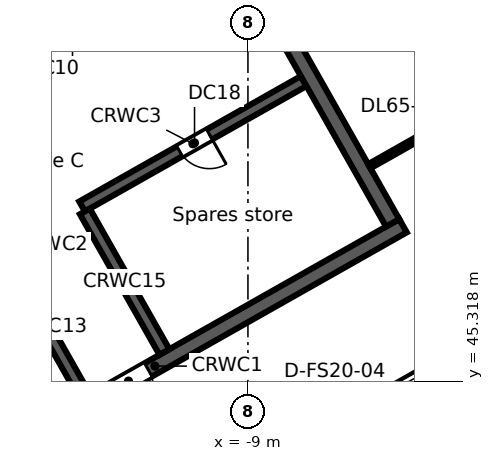
"""IFC4 building model, lengths in metres.
Left out: names, types, materials, properties, quantities, classifications, styles, units other than length and angle.
Written with IfcOpenShell. Run it as: python <this file> out.ifc"""

import sys

from ifc_helpers import new_model, si_unit, direction, frame, frame_2d, origin, place, context, subcontext, project, spatial, rectangle, extrude, element, fill, save


model = new_model("IFC4")
c1 = context("Model", 3, precision=1e-05, world=origin(), true_north=direction((0.0, 1.0)))
c2 = subcontext(c1, "Body", "Model", "MODEL_VIEW")
j1 = project(units=[si_unit("LENGTHUNIT", "METRE"), si_unit("PLANEANGLEUNIT", "RADIAN")], contexts=[c1])
p1 = place(None, origin())
s1 = spatial("IfcSite", under=j1, at=p1, CompositionType="ELEMENT")
p2 = place(p1, origin())
s2 = spatial("IfcBuilding", under=s1, at=p2, CompositionType="ELEMENT")
p3 = place(p2, frame((0.0, 0.0, 300.7)))
s3 = spatial("IfcBuildingStorey", under=s2, at=p3, CompositionType="ELEMENT", Elevation=300.7)
p4 = place(p3, frame((-58.732, 38.771, 0.0), z_axis=(0.0, 0.0, 1.0), x_axis=(0.870355615581, 0.492423702137, 0.0)))
e1 = element("IfcWall", 1, at=p4, inside=s3, PredefinedType="STANDARD", context=c2, shape_type="SweptSolid", body=[
    extrude(rectangle(XDim=64.052, YDim=0.25, at=frame_2d((32.026, 0.0))), origin(), (0.0, 0.0, 1.0), 3.52),
])
p5 = place(p4, frame((61.259, 0.0, 0.8)))
e2 = element("IfcOpeningElement", 2, at=p5, cuts=e1, PredefinedType="OPENING", context=c2, shape_type="SweptSolid", body=[
    extrude(rectangle(XDim=2.4, YDim=2.2, at=frame_2d((1.2, 1.1))), frame((0.0, 0.135, 0.0), z_axis=(0.0, -1.0, 0.0), x_axis=(1.0, 0.0, 0.0)), (0.0, 0.0, 1.0), 0.27),
])
p6 = place(p4, frame((58.216, 0.0, 0.8)))
e3 = element("IfcOpeningElement", 3, at=p6, cuts=e1, PredefinedType="OPENING", context=c2, shape_type="SweptSolid", body=[
    extrude(rectangle(XDim=2.4, YDim=2.2, at=frame_2d((1.2, 1.1))), frame((0.0, 0.135, 0.0), z_axis=(0.0, -1.0, 0.0), x_axis=(1.0, 0.0, 0.0)), (0.0, 0.0, 1.0), 0.27),
])
p7 = place(p4, frame((55.173, 0.0, 0.8)))
e4 = element("IfcOpeningElement", 4, at=p7, cuts=e1, PredefinedType="OPENING", context=c2, shape_type="SweptSolid", body=[
    extrude(rectangle(XDim=2.4, YDim=2.2, at=frame_2d((1.2, 1.1))), frame((0.0, 0.135, 0.0), z_axis=(0.0, -1.0, 0.0), x_axis=(1.0, 0.0, 0.0)), (0.0, 0.0, 1.0), 0.27),
])
p8 = place(p4, frame((52.129, 0.0, 0.8)))
e5 = element("IfcOpeningElement", 5, at=p8, cuts=e1, PredefinedType="OPENING", context=c2, shape_type="SweptSolid", body=[
    extrude(rectangle(XDim=2.4, YDim=2.2, at=frame_2d((1.2, 1.1))), frame((0.0, 0.135, 0.0), z_axis=(0.0, -1.0, 0.0), x_axis=(1.0, 0.0, 0.0)), (0.0, 0.0, 1.0), 0.27),
])
p9 = place(p4, frame((49.086, 0.0, 0.8)))
e6 = element("IfcOpeningElement", 6, at=p9, cuts=e1, PredefinedType="OPENING", context=c2, shape_type="SweptSolid", body=[
    extrude(rectangle(XDim=2.4, YDim=2.2, at=frame_2d((1.2, 1.1))), frame((0.0, 0.135, 0.0), z_axis=(0.0, -1.0, 0.0), x_axis=(1.0, 0.0, 0.0)), (0.0, 0.0, 1.0), 0.27),
])
p10 = place(p4, frame((46.043, 0.0, 0.8)))
e7 = element("IfcOpeningElement", 7, at=p10, cuts=e1, PredefinedType="OPENING", context=c2, shape_type="SweptSolid", body=[
    extrude(rectangle(XDim=2.4, YDim=2.2, at=frame_2d((1.2, 1.1))), frame((0.0, 0.135, 0.0), z_axis=(0.0, -1.0, 0.0), x_axis=(1.0, 0.0, 0.0)), (0.0, 0.0, 1.0), 0.27),
])
p11 = place(p4, frame((43.0, 0.0, 0.8)))
e8 = element("IfcOpeningElement", 8, at=p11, cuts=e1, PredefinedType="OPENING", context=c2, shape_type="SweptSolid", body=[
    extrude(rectangle(XDim=2.4, YDim=2.2, at=frame_2d((1.2, 1.1))), frame((0.0, 0.135, 0.0), z_axis=(0.0, -1.0, 0.0), x_axis=(1.0, 0.0, 0.0)), (0.0, 0.0, 1.0), 0.27),
])
p12 = place(p4, frame((39.956, 0.0, 0.8)))
e9 = element("IfcOpeningElement", 9, at=p12, cuts=e1, PredefinedType="OPENING", context=c2, shape_type="SweptSolid", body=[
    extrude(rectangle(XDim=2.4, YDim=2.2, at=frame_2d((1.2, 1.1))), frame((0.0, 0.135, 0.0), z_axis=(0.0, -1.0, 0.0), x_axis=(1.0, 0.0, 0.0)), (0.0, 0.0, 1.0), 0.27),
])
p13 = place(p4, frame((36.913, 0.0, 0.8)))
e10 = element("IfcOpeningElement", 10, at=p13, cuts=e1, PredefinedType="OPENING", context=c2, shape_type="SweptSolid", body=[
    extrude(rectangle(XDim=2.4, YDim=2.2, at=frame_2d((1.2, 1.1))), frame((0.0, 0.135, 0.0), z_axis=(0.0, -1.0, 0.0), x_axis=(1.0, 0.0, 0.0)), (0.0, 0.0, 1.0), 0.27),
])
p14 = place(p4, frame((33.87, 0.0, 0.8)))
e11 = element("IfcOpeningElement", 11, at=p14, cuts=e1, PredefinedType="OPENING", context=c2, shape_type="SweptSolid", body=[
    extrude(rectangle(XDim=2.4, YDim=2.2, at=frame_2d((1.2, 1.1))), frame((0.0, 0.135, 0.0), z_axis=(0.0, -1.0, 0.0), x_axis=(1.0, 0.0, 0.0)), (0.0, 0.0, 1.0), 0.27),
])
p15 = place(p4, frame((30.826, 0.0, 0.8)))
e12 = element("IfcOpeningElement", 12, at=p15, cuts=e1, PredefinedType="OPENING", context=c2, shape_type="SweptSolid", body=[
    extrude(rectangle(XDim=2.4, YDim=2.2, at=frame_2d((1.2, 1.1))), frame((0.0, 0.135, 0.0), z_axis=(0.0, -1.0, 0.0), x_axis=(1.0, 0.0, 0.0)), (0.0, 0.0, 1.0), 0.27),
])
p16 = place(p4, frame((27.783, 0.0, 0.8)))
e13 = element("IfcOpeningElement", 13, at=p16, cuts=e1, PredefinedType="OPENING", context=c2, shape_type="SweptSolid", body=[
    extrude(rectangle(XDim=2.4, YDim=2.2, at=frame_2d((1.2, 1.1))), frame((0.0, 0.135, 0.0), z_axis=(0.0, -1.0, 0.0), x_axis=(1.0, 0.0, 0.0)), (0.0, 0.0, 1.0), 0.27),
])
p17 = place(p4, frame((24.74, 0.0, 0.8)))
e14 = element("IfcOpeningElement", 14, at=p17, cuts=e1, PredefinedType="OPENING", context=c2, shape_type="SweptSolid", body=[
    extrude(rectangle(XDim=2.4, YDim=2.2, at=frame_2d((1.2, 1.1))), frame((0.0, 0.135, 0.0), z_axis=(0.0, -1.0, 0.0), x_axis=(1.0, 0.0, 0.0)), (0.0, 0.0, 1.0), 0.27),
])
p18 = place(p4, frame((21.696, 0.0, 0.8)))
e15 = element("IfcOpeningElement", 15, at=p18, cuts=e1, PredefinedType="OPENING", context=c2, shape_type="SweptSolid", body=[
    extrude(rectangle(XDim=2.4, YDim=2.2, at=frame_2d((1.2, 1.1))), frame((0.0, 0.135, 0.0), z_axis=(0.0, -1.0, 0.0), x_axis=(1.0, 0.0, 0.0)), (0.0, 0.0, 1.0), 0.27),
])
p19 = place(p4, frame((18.653, 0.0, 0.8)))
e16 = element("IfcOpeningElement", 16, at=p19, cuts=e1, PredefinedType="OPENING", context=c2, shape_type="SweptSolid", body=[
    extrude(rectangle(XDim=2.4, YDim=2.2, at=frame_2d((1.2, 1.1))), frame((0.0, 0.135, 0.0), z_axis=(0.0, -1.0, 0.0), x_axis=(1.0, 0.0, 0.0)), (0.0, 0.0, 1.0), 0.27),
])
p20 = place(p4, frame((15.61, 0.0, 0.8)))
e17 = element("IfcOpeningElement", 17, at=p20, cuts=e1, PredefinedType="OPENING", context=c2, shape_type="SweptSolid", body=[
    extrude(rectangle(XDim=2.4, YDim=2.2, at=frame_2d((1.2, 1.1))), frame((0.0, 0.135, 0.0), z_axis=(0.0, -1.0, 0.0), x_axis=(1.0, 0.0, 0.0)), (0.0, 0.0, 1.0), 0.27),
])
p21 = place(p4, frame((12.567, 0.0, 0.8)))
e18 = element("IfcOpeningElement", 18, at=p21, cuts=e1, PredefinedType="OPENING", context=c2, shape_type="SweptSolid", body=[
    extrude(rectangle(XDim=2.4, YDim=2.2, at=frame_2d((1.2, 1.1))), frame((0.0, 0.135, 0.0), z_axis=(0.0, -1.0, 0.0), x_axis=(1.0, 0.0, 0.0)), (0.0, 0.0, 1.0), 0.27),
])
p22 = place(p4, frame((9.523, 0.0, 0.8)))
e19 = element("IfcOpeningElement", 19, at=p22, cuts=e1, PredefinedType="OPENING", context=c2, shape_type="SweptSolid", body=[
    extrude(rectangle(XDim=2.4, YDim=2.2, at=frame_2d((1.2, 1.1))), frame((0.0, 0.135, 0.0), z_axis=(0.0, -1.0, 0.0), x_axis=(1.0, 0.0, 0.0)), (0.0, 0.0, 1.0), 0.27),
])
p23 = place(p4, frame((6.48, 0.0, 0.8)))
e20 = element("IfcOpeningElement", 20, at=p23, cuts=e1, PredefinedType="OPENING", context=c2, shape_type="SweptSolid", body=[
    extrude(rectangle(XDim=2.4, YDim=2.2, at=frame_2d((1.2, 1.1))), frame((0.0, 0.135, 0.0), z_axis=(0.0, -1.0, 0.0), x_axis=(1.0, 0.0, 0.0)), (0.0, 0.0, 1.0), 0.27),
])
p24 = place(p4, frame((3.437, 0.0, 0.8)))
e21 = element("IfcOpeningElement", 21, at=p24, cuts=e1, PredefinedType="OPENING", context=c2, shape_type="SweptSolid", body=[
    extrude(rectangle(XDim=2.4, YDim=2.2, at=frame_2d((1.2, 1.1))), frame((0.0, 0.135, 0.0), z_axis=(0.0, -1.0, 0.0), x_axis=(1.0, 0.0, 0.0)), (0.0, 0.0, 1.0), 0.27),
])
p25 = place(p4, frame((0.393, 0.0, 0.8)))
e22 = element("IfcOpeningElement", 22, at=p25, cuts=e1, PredefinedType="OPENING", context=c2, shape_type="SweptSolid", body=[
    extrude(rectangle(XDim=2.4, YDim=2.2, at=frame_2d((1.2, 1.1))), frame((0.0, 0.135, 0.0), z_axis=(0.0, -1.0, 0.0), x_axis=(1.0, 0.0, 0.0)), (0.0, 0.0, 1.0), 0.27),
])
p26 = place(p3, frame((-3.017, 46.293, 0.0), z_axis=(0.0, 0.0, 1.0), x_axis=(-0.870355474887, -0.492423950812, 0.0)))
e23 = element("IfcWall", 23, at=p26, inside=s3, PredefinedType="STANDARD", context=c2, shape_type="SweptSolid", body=[
    extrude(rectangle(XDim=40.34, YDim=0.25, at=frame_2d((20.17, 0.0))), origin(), (0.0, 0.0, 1.0), 3.52),
])
p27 = place(p26, frame((37.428, 0.0, 0.8)))
e24 = element("IfcOpeningElement", 24, at=p27, cuts=e23, PredefinedType="OPENING", context=c2, shape_type="SweptSolid", body=[
    extrude(rectangle(XDim=2.4, YDim=2.2, at=frame_2d((1.2, 1.1))), frame((0.0, 0.135, 0.0), z_axis=(0.0, -1.0, 0.0), x_axis=(1.0, 0.0, 0.0)), (0.0, 0.0, 1.0), 0.27),
])
p28 = place(p26, frame((34.372, 0.0, 0.0)))
e25 = element("IfcOpeningElement", 25, at=p28, cuts=e23, PredefinedType="OPENING", context=c2, shape_type="SweptSolid", body=[
    extrude(rectangle(XDim=1.8, YDim=2.4, at=frame_2d((0.9, 1.2))), frame((0.0, 0.135, 0.0), z_axis=(0.0, -1.0, 0.0), x_axis=(1.0, 0.0, 0.0)), (0.0, 0.0, 1.0), 0.27),
])
p29 = place(p26, frame((30.716, 0.0, 0.8)))
e26 = element("IfcOpeningElement", 26, at=p29, cuts=e23, PredefinedType="OPENING", context=c2, shape_type="SweptSolid", body=[
    extrude(rectangle(XDim=2.4, YDim=2.2, at=frame_2d((1.2, 1.1))), frame((0.0, 0.135, 0.0), z_axis=(0.0, -1.0, 0.0), x_axis=(1.0, 0.0, 0.0)), (0.0, 0.0, 1.0), 0.27),
])
p30 = place(p26, frame((27.36, 0.0, 0.8)))
e27 = element("IfcOpeningElement", 27, at=p30, cuts=e23, PredefinedType="OPENING", context=c2, shape_type="SweptSolid", body=[
    extrude(rectangle(XDim=2.4, YDim=2.2, at=frame_2d((1.2, 1.1))), frame((0.0, 0.135, 0.0), z_axis=(0.0, -1.0, 0.0), x_axis=(1.0, 0.0, 0.0)), (0.0, 0.0, 1.0), 0.27),
])
p31 = place(p26, frame((24.304, 0.0, 0.0)))
e28 = element("IfcOpeningElement", 28, at=p31, cuts=e23, PredefinedType="OPENING", context=c2, shape_type="SweptSolid", body=[
    extrude(rectangle(XDim=1.8, YDim=2.4, at=frame_2d((0.9, 1.2))), frame((0.0, 0.135, 0.0), z_axis=(0.0, -1.0, 0.0), x_axis=(1.0, 0.0, 0.0)), (0.0, 0.0, 1.0), 0.27),
])
p32 = place(p26, frame((20.648, 0.0, 0.8)))
e29 = element("IfcOpeningElement", 29, at=p32, cuts=e23, PredefinedType="OPENING", context=c2, shape_type="SweptSolid", body=[
    extrude(rectangle(XDim=2.4, YDim=2.2, at=frame_2d((1.2, 1.1))), frame((0.0, 0.135, 0.0), z_axis=(0.0, -1.0, 0.0), x_axis=(1.0, 0.0, 0.0)), (0.0, 0.0, 1.0), 0.27),
])
p33 = place(p26, frame((17.292, 0.0, 0.8)))
e30 = element("IfcOpeningElement", 30, at=p33, cuts=e23, PredefinedType="OPENING", context=c2, shape_type="SweptSolid", body=[
    extrude(rectangle(XDim=2.4, YDim=2.2, at=frame_2d((1.2, 1.1))), frame((0.0, 0.135, 0.0), z_axis=(0.0, -1.0, 0.0), x_axis=(1.0, 0.0, 0.0)), (0.0, 0.0, 1.0), 0.27),
])
p34 = place(p26, frame((14.236, 0.0, 0.0)))
e31 = element("IfcOpeningElement", 31, at=p34, cuts=e23, PredefinedType="OPENING", context=c2, shape_type="SweptSolid", body=[
    extrude(rectangle(XDim=1.8, YDim=2.4, at=frame_2d((0.9, 1.2))), frame((0.0, 0.135, 0.0), z_axis=(0.0, -1.0, 0.0), x_axis=(1.0, 0.0, 0.0)), (0.0, 0.0, 1.0), 0.27),
])
p35 = place(p26, frame((10.58, 0.0, 0.8)))
e32 = element("IfcOpeningElement", 32, at=p35, cuts=e23, PredefinedType="OPENING", context=c2, shape_type="SweptSolid", body=[
    extrude(rectangle(XDim=2.4, YDim=2.2, at=frame_2d((1.2, 1.1))), frame((0.0, 0.135, 0.0), z_axis=(0.0, -1.0, 0.0), x_axis=(1.0, 0.0, 0.0)), (0.0, 0.0, 1.0), 0.27),
])
p36 = place(p26, frame((7.224, 0.0, 0.8)))
e33 = element("IfcOpeningElement", 33, at=p36, cuts=e23, PredefinedType="OPENING", context=c2, shape_type="SweptSolid", body=[
    extrude(rectangle(XDim=2.4, YDim=2.2, at=frame_2d((1.2, 1.1))), frame((0.0, 0.135, 0.0), z_axis=(0.0, -1.0, 0.0), x_axis=(1.0, 0.0, 0.0)), (0.0, 0.0, 1.0), 0.27),
])
p37 = place(p26, frame((4.168, 0.0, 0.0)))
e34 = element("IfcOpeningElement", 34, at=p37, cuts=e23, PredefinedType="OPENING", context=c2, shape_type="SweptSolid", body=[
    extrude(rectangle(XDim=1.8, YDim=2.4, at=frame_2d((0.9, 1.2))), frame((0.0, 0.135, 0.0), z_axis=(0.0, -1.0, 0.0), x_axis=(1.0, 0.0, 0.0)), (0.0, 0.0, 1.0), 0.27),
])
p38 = place(p26, frame((0.512, 0.0, 0.8)))
e35 = element("IfcOpeningElement", 35, at=p38, cuts=e23, PredefinedType="OPENING", context=c2, shape_type="SweptSolid", body=[
    extrude(rectangle(XDim=2.4, YDim=2.2, at=frame_2d((1.2, 1.1))), frame((0.0, 0.135, 0.0), z_axis=(0.0, -1.0, 0.0), x_axis=(1.0, 0.0, 0.0)), (0.0, 0.0, 1.0), 0.27),
])
p39 = place(p3, frame((-17.975, 42.017, 0.0), z_axis=(0.0, 0.0, 1.0), x_axis=(0.87034965173, 0.492434243055, 0.0)))
e36 = element("IfcWall", 36, at=p39, inside=s3, PredefinedType="SOLIDWALL", context=c2, shape_type="SweptSolid", body=[
    extrude(rectangle(XDim=15.0, YDim=0.4, at=frame_2d((7.5, 0.0))), origin(), (0.0, 0.0, 1.0), 3.52),
])
p40 = place(p39, frame((6.1, 0.0, 0.0)))
e37 = element("IfcOpeningElement", 37, at=p40, cuts=e36, PredefinedType="OPENING", context=c2, shape_type="SweptSolid", body=[
    extrude(rectangle(XDim=1.2, YDim=2.1, at=frame_2d((0.6, 1.05))), frame((0.0, 0.21, 0.0), z_axis=(0.0, -1.0, 0.0), x_axis=(1.0, 0.0, 0.0)), (0.0, 0.0, 1.0), 0.42),
])
p41 = place(p3, frame((-13.365, 49.911, 0.0), z_axis=(0.0, 0.0, 1.0), x_axis=(0.870347618718, 0.492437836272, 0.0)))
e38 = element("IfcWall", 38, at=p41, inside=s3, PredefinedType="SOLIDWALL", context=c2, shape_type="SweptSolid", body=[
    extrude(rectangle(XDim=6.7, YDim=0.3, at=frame_2d((3.35, 0.0))), origin(), (0.0, 0.0, 1.0), 3.52),
])
p42 = place(p41, frame((2.95, 0.0, 0.0)))
e39 = element("IfcOpeningElement", 39, at=p42, cuts=e38, PredefinedType="OPENING", context=c2, shape_type="SweptSolid", body=[
    extrude(rectangle(XDim=0.9, YDim=2.1, at=frame_2d((0.45, 1.05))), frame((0.0, 0.16, 0.0), z_axis=(0.0, -1.0, 0.0), x_axis=(1.0, 0.0, 0.0)), (0.0, 0.0, 1.0), 0.32),
])
p43 = place(p3, frame((-15.618, 53.691, 0.0), z_axis=(0.0, 0.0, 1.0), x_axis=(0.870362830851, 0.492410948978, 0.0)))
e40 = element("IfcWall", 40, at=p43, inside=s3, PredefinedType="SOLIDWALL", context=c2, shape_type="SweptSolid", body=[
    extrude(rectangle(XDim=6.8, YDim=0.3, at=frame_2d((3.4, 0.0))), origin(), (0.0, 0.0, 1.0), 3.52),
])
p44 = place(p43, frame((1.85, 0.0, 0.0)))
e41 = element("IfcOpeningElement", 41, at=p44, cuts=e40, PredefinedType="OPENING", context=c2, shape_type="SweptSolid", body=[
    extrude(rectangle(XDim=0.9, YDim=2.1, at=frame_2d((0.45, 1.05))), frame((0.0, 0.16, 0.0), z_axis=(0.0, -1.0, 0.0), x_axis=(1.0, 0.0, 0.0)), (0.0, 0.0, 1.0), 0.32),
])
p45 = place(p43, frame((5.3, 0.0, 0.0)))
e42 = element("IfcOpeningElement", 42, at=p45, cuts=e40, PredefinedType="OPENING", context=c2, shape_type="SweptSolid", body=[
    extrude(rectangle(XDim=0.9, YDim=2.1, at=frame_2d((0.45, 1.05))), frame((0.0, 0.16, 0.0), z_axis=(0.0, -1.0, 0.0), x_axis=(1.0, 0.0, 0.0)), (0.0, 0.0, 1.0), 0.32),
])
p46 = place(p3, frame((-24.672, 53.854, 0.0), z_axis=(0.0, 0.0, 1.0), x_axis=(0.870353598469, 0.492427267353, 0.0)))
e43 = element("IfcWall", 43, at=p46, inside=s3, PredefinedType="SOLIDWALL", context=c2, shape_type="SweptSolid", body=[
    extrude(rectangle(XDim=15.0, YDim=0.4, at=frame_2d((7.5, 0.0))), origin(), (0.0, 0.0, 1.0), 3.52),
])
p47 = place(p3, frame((-15.379, 48.599, 0.0), z_axis=(0.0, 0.0, 1.0), x_axis=(0.492422543467, -0.870356271124, 0.0)))
e44 = element("IfcWall", 44, at=p47, inside=s3, PredefinedType="SOLIDWALL", context=c2, shape_type="SweptSolid", body=[
    extrude(rectangle(XDim=4.25, YDim=0.3, at=frame_2d((2.125, 0.0))), origin(), (0.0, 0.0, 1.0), 3.52),
])
p48 = place(p3, frame((-13.291, 49.781, 0.0), z_axis=(0.0, 0.0, 1.0), x_axis=(0.492397924348, -0.870370199454, 0.0)))
e45 = element("IfcWall", 45, at=p48, inside=s3, PredefinedType="SOLIDWALL", context=c2, shape_type="SweptSolid", body=[
    extrude(rectangle(XDim=4.25, YDim=0.3, at=frame_2d((2.125, 0.0))), origin(), (0.0, 0.0, 1.0), 3.52),
])
p49 = place(p3, frame((-11.692, 60.968, 0.0), z_axis=(0.0, 0.0, 1.0), x_axis=(0.492421663121, -0.870356769198, 0.0)))
e46 = element("IfcWall", 46, at=p49, inside=s3, PredefinedType="SOLIDWALL", context=c2, shape_type="SweptSolid", body=[
    extrude(rectangle(XDim=13.2, YDim=0.4, at=frame_2d((6.6, 0.0))), origin(), (0.0, 0.0, 1.0), 3.52),
])
p50 = place(p3, frame((-5.806, 50.97, 0.0), z_axis=(0.0, 0.0, 1.0), x_axis=(0.870355163327, 0.492424501492, 0.0)))
e47 = element("IfcWall", 47, at=p50, inside=s3, PredefinedType="PARTITIONING", context=c2, shape_type="SweptSolid", body=[
    extrude(rectangle(XDim=6.527, YDim=0.125, at=frame_2d((3.264, 0.0))), origin(), (0.0, 0.0, 1.0), 2.8),
])
p51 = place(p50, frame((2.7, 0.0, 0.0)))
e48 = element("IfcOpeningElement", 48, at=p51, cuts=e47, PredefinedType="OPENING", context=c2, shape_type="SweptSolid", body=[
    extrude(rectangle(XDim=0.9, YDim=2.1, at=frame_2d((0.45, 1.05))), frame((0.0, 0.073, 0.0), z_axis=(0.0, -1.0, 0.0), x_axis=(1.0, 0.0, 0.0)), (0.0, 0.0, 1.0), 0.145),
])
p52 = place(p38, origin())
e49 = element("IfcWindow", 49, at=p52, inside=s3, PartitioningType="SINGLE_PANEL", PredefinedType="WINDOW", context=c2, shape_type="SweptSolid", body=[
    extrude(rectangle(XDim=2.4, YDim=2.2, at=frame_2d((1.2, 1.1))), frame((0.0, 0.03, 0.0), z_axis=(0.0, -1.0, 0.0), x_axis=(1.0, 0.0, 0.0)), (0.0, 0.0, 1.0), 0.06),
])
fill(e35, e49)
p53 = place(p40, frame((1.2, 0.0, 0.0), z_axis=(0.0, 0.0, 1.0), x_axis=(-1.0, 0.0, 0.0)))
e50 = element("IfcDoor", 50, at=p53, inside=s3, OperationType="SINGLE_SWING_RIGHT", PredefinedType="DOOR", context=c2, shape_type="SweptSolid", body=[
    extrude(rectangle(XDim=1.2, YDim=2.1, at=frame_2d((0.6, 1.05))), frame((0.0, 0.025, 0.0), z_axis=(0.0, -1.0, 0.0), x_axis=(1.0, 0.0, 0.0)), (0.0, 0.0, 1.0), 0.05),
])
fill(e37, e50)
p54 = place(p42, frame((0.9, 0.0, 0.0), z_axis=(0.0, 0.0, 1.0), x_axis=(-1.0, 0.0, 0.0)))
e51 = element("IfcDoor", 51, at=p54, inside=s3, OperationType="SINGLE_SWING_LEFT", PredefinedType="DOOR", context=c2, shape_type="SweptSolid", body=[
    extrude(rectangle(XDim=0.9, YDim=2.1, at=frame_2d((0.45, 1.05))), frame((0.0, 0.025, 0.0), z_axis=(0.0, -1.0, 0.0), x_axis=(1.0, 0.0, 0.0)), (0.0, 0.0, 1.0), 0.05),
])
fill(e39, e51)
save(model, sys.argv[1])
